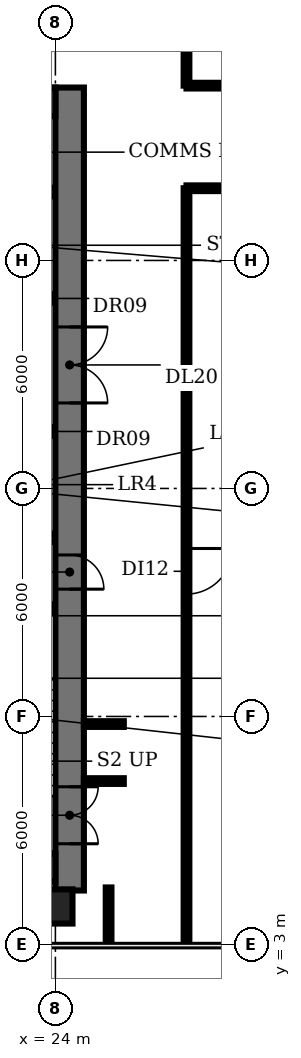
"""IFC4 building model, lengths in metres.
Left out: names, types, materials, properties, quantities, classifications, styles, units other than length and angle.
Written with IfcOpenShell. Run it as: python <this file> out.ifc"""

import sys

from ifc_helpers import new_model, si_unit, direction, frame, frame_2d, origin, origin_2d, place, context, subcontext, project, spatial, rectangle, extrude, element, fill, save


model = new_model("IFC4")
c1 = context("Model", 3, precision=1e-05, world=origin(), true_north=direction((0.0, 1.0)))
c2 = subcontext(c1, "Body", "Model", "MODEL_VIEW")
j1 = project(units=[si_unit("LENGTHUNIT", "METRE"), si_unit("PLANEANGLEUNIT", "RADIAN")], contexts=[c1])
p1 = place(None, origin())
s1 = spatial("IfcSite", under=j1, at=p1, CompositionType="ELEMENT")
p2 = place(p1, origin())
s2 = spatial("IfcBuilding", under=s1, at=p2, CompositionType="ELEMENT")
p3 = place(p2, frame((0.0, 0.0, 104.6)))
s3 = spatial("IfcBuildingStorey", under=s2, at=p3, CompositionType="ELEMENT", Elevation=104.6)
p4 = place(p3, frame((24.0, 4.0, 0.0), z_axis=(0.0, 0.0, 1.0), x_axis=(1.0, 0.0, 0.0)))
e1 = element("IfcColumn", 1, at=p4, inside=s3, PredefinedType="COLUMN", context=c2, shape_type="SweptSolid", body=[
    extrude(rectangle(XDim=0.9, YDim=0.9, at=origin_2d()), origin(), (0.0, 0.0, 1.0), 3.85),
])
p5 = place(p3, frame((20.85, 11.825, 0.0), z_axis=(0.0, 0.0, 1.0), x_axis=(1.0, 0.0, 0.0)))
e2 = element("IfcWall", 2, at=p5, inside=s3, PredefinedType="SHEAR", context=c2, shape_type="SweptSolid", body=[
    extrude(rectangle(XDim=3.15, YDim=0.25, at=frame_2d((1.575, 0.0))), origin(), (0.0, 0.0, 1.0), 3.85),
])
p6 = place(p3, frame((16.6, 13.7, 0.0), z_axis=(0.0, 0.0, 1.0), x_axis=(1.0, 0.0, 0.0)))
e3 = element("IfcWall", 3, at=p6, inside=s3, PredefinedType="PARTITIONING", context=c2, shape_type="SweptSolid", body=[
    extrude(rectangle(XDim=7.4, YDim=0.225, at=frame_2d((3.7, 0.0))), origin(), (0.0, 0.0, 1.0), 3.85),
])
p7 = place(p3, frame((9.4, 16.5, 0.0), z_axis=(0.0, 0.0, 1.0), x_axis=(1.0, 0.0, 0.0)))
e4 = element("IfcWall", 4, at=p7, inside=s3, PredefinedType="PARTITIONING", context=c2, shape_type="SweptSolid", body=[
    extrude(rectangle(XDim=14.6, YDim=0.225, at=frame_2d((7.3, 0.0))), origin(), (0.0, 0.0, 1.0), 3.85),
])
p8 = place(p7, frame((0.75, 0.0, 0.0)))
e5 = element("IfcOpeningElement", 5, at=p8, cuts=e4, PredefinedType="OPENING", context=c2, shape_type="SweptSolid", body=[
    extrude(rectangle(XDim=1.1, YDim=2.1, at=frame_2d((0.55, 1.05))), frame((0.0, 0.123, 0.0), z_axis=(0.0, -1.0, 0.0), x_axis=(1.0, 0.0, 0.0)), (0.0, 0.0, 1.0), 0.245),
])
p9 = place(p7, frame((3.55, 0.0, 0.0)))
e6 = element("IfcOpeningElement", 6, at=p9, cuts=e4, PredefinedType="OPENING", context=c2, shape_type="SweptSolid", body=[
    extrude(rectangle(XDim=1.1, YDim=2.1, at=frame_2d((0.55, 1.05))), frame((0.0, 0.123, 0.0), z_axis=(0.0, -1.0, 0.0), x_axis=(1.0, 0.0, 0.0)), (0.0, 0.0, 1.0), 0.245),
])
p10 = place(p7, frame((6.35, 0.0, 0.0)))
e7 = element("IfcOpeningElement", 7, at=p10, cuts=e4, PredefinedType="OPENING", context=c2, shape_type="SweptSolid", body=[
    extrude(rectangle(XDim=1.1, YDim=2.1, at=frame_2d((0.55, 1.05))), frame((0.0, 0.123, 0.0), z_axis=(0.0, -1.0, 0.0), x_axis=(1.0, 0.0, 0.0)), (0.0, 0.0, 1.0), 0.245),
])
p11 = place(p7, frame((9.15, 0.0, 0.0)))
e8 = element("IfcOpeningElement", 8, at=p11, cuts=e4, PredefinedType="OPENING", context=c2, shape_type="SweptSolid", body=[
    extrude(rectangle(XDim=1.1, YDim=2.1, at=frame_2d((0.55, 1.05))), frame((0.0, 0.123, 0.0), z_axis=(0.0, -1.0, 0.0), x_axis=(1.0, 0.0, 0.0)), (0.0, 0.0, 1.0), 0.245),
])
p12 = place(p7, frame((11.647, 0.0, 0.0)))
e9 = element("IfcOpeningElement", 9, at=p12, cuts=e4, PredefinedType="OPENING", context=c2, shape_type="SweptSolid", body=[
    extrude(rectangle(XDim=0.9, YDim=2.1, at=frame_2d((0.45, 1.05))), frame((0.0, 0.123, 0.0), z_axis=(0.0, -1.0, 0.0), x_axis=(1.0, 0.0, 0.0)), (0.0, 0.0, 1.0), 0.245),
])
p13 = place(p7, frame((13.423, 0.0, 0.0)))
e10 = element("IfcOpeningElement", 10, at=p13, cuts=e4, PredefinedType="OPENING", context=c2, shape_type="SweptSolid", body=[
    extrude(rectangle(XDim=0.9, YDim=2.1, at=frame_2d((0.45, 1.05))), frame((0.0, 0.123, 0.0), z_axis=(0.0, -1.0, 0.0), x_axis=(1.0, 0.0, 0.0)), (0.0, 0.0, 1.0), 0.245),
])
p14 = place(p3, frame((24.0, 20.0, 0.0), z_axis=(0.0, 0.0, 1.0), x_axis=(-1.0, 0.0, 0.0)))
e11 = element("IfcWall", 11, at=p14, inside=s3, PredefinedType="PARTITIONING", context=c2, shape_type="SweptSolid", body=[
    extrude(rectangle(XDim=14.6, YDim=0.225, at=frame_2d((7.3, 0.0))), origin(), (0.0, 0.0, 1.0), 3.85),
])
p15 = place(p14, frame((12.9, 0.0, 0.0)))
e12 = element("IfcOpeningElement", 12, at=p15, cuts=e11, PredefinedType="OPENING", context=c2, shape_type="SweptSolid", body=[
    extrude(rectangle(XDim=0.9, YDim=2.1, at=frame_2d((0.45, 1.05))), frame((0.0, 0.123, 0.0), z_axis=(0.0, -1.0, 0.0), x_axis=(1.0, 0.0, 0.0)), (0.0, 0.0, 1.0), 0.245),
])
p16 = place(p14, frame((9.475, 0.0, 0.0)))
e13 = element("IfcOpeningElement", 13, at=p16, cuts=e11, PredefinedType="OPENING", context=c2, shape_type="SweptSolid", body=[
    extrude(rectangle(XDim=1.0, YDim=2.1, at=frame_2d((0.5, 1.05))), frame((0.0, 0.123, 0.0), z_axis=(0.0, -1.0, 0.0), x_axis=(1.0, 0.0, 0.0)), (0.0, 0.0, 1.0), 0.245),
])
p17 = place(p14, frame((6.375, 0.0, 0.0)))
e14 = element("IfcOpeningElement", 14, at=p17, cuts=e11, PredefinedType="OPENING", context=c2, shape_type="SweptSolid", body=[
    extrude(rectangle(XDim=0.9, YDim=2.1, at=frame_2d((0.45, 1.05))), frame((0.0, 0.123, 0.0), z_axis=(0.0, -1.0, 0.0), x_axis=(1.0, 0.0, 0.0)), (0.0, 0.0, 1.0), 0.245),
])
p18 = place(p14, frame((4.175, 0.0, 0.0)))
e15 = element("IfcOpeningElement", 15, at=p18, cuts=e11, PredefinedType="OPENING", context=c2, shape_type="SweptSolid", body=[
    extrude(rectangle(XDim=0.9, YDim=2.1, at=frame_2d((0.45, 1.05))), frame((0.0, 0.123, 0.0), z_axis=(0.0, -1.0, 0.0), x_axis=(1.0, 0.0, 0.0)), (0.0, 0.0, 1.0), 0.245),
])
p19 = place(p14, frame((2.137, 0.0, 0.0)))
e16 = element("IfcOpeningElement", 16, at=p19, cuts=e11, PredefinedType="OPENING", context=c2, shape_type="SweptSolid", body=[
    extrude(rectangle(XDim=0.9, YDim=2.1, at=frame_2d((0.45, 1.05))), frame((0.0, 0.123, 0.0), z_axis=(0.0, -1.0, 0.0), x_axis=(1.0, 0.0, 0.0)), (0.0, 0.0, 1.0), 0.245),
])
p20 = place(p14, frame((0.363, 0.0, 0.0)))
e17 = element("IfcOpeningElement", 17, at=p20, cuts=e11, PredefinedType="OPENING", context=c2, shape_type="SweptSolid", body=[
    extrude(rectangle(XDim=0.9, YDim=2.1, at=frame_2d((0.45, 1.05))), frame((0.0, 0.123, 0.0), z_axis=(0.0, -1.0, 0.0), x_axis=(1.0, 0.0, 0.0)), (0.0, 0.0, 1.0), 0.245),
])
p21 = place(p3, frame((9.4, 22.8, 0.0), z_axis=(0.0, 0.0, 1.0), x_axis=(1.0, 0.0, 0.0)))
e18 = element("IfcWall", 18, at=p21, inside=s3, PredefinedType="PARTITIONING", context=c2, shape_type="SweptSolid", body=[
    extrude(rectangle(XDim=14.6, YDim=0.225, at=frame_2d((7.3, 0.0))), origin(), (0.0, 0.0, 1.0), 3.85),
])
p22 = place(p3, frame((24.375, 25.55, 0.0), z_axis=(0.0, 0.0, 1.0), x_axis=(0.0, -1.0, 0.0)))
e19 = element("IfcWall", 19, at=p22, inside=s3, PredefinedType="SHEAR", context=c2, shape_type="SweptSolid", body=[
    extrude(rectangle(XDim=21.13, YDim=0.75, at=frame_2d((10.565, 0.0))), origin(), (0.0, 0.0, 1.0), 3.85),
])
p23 = place(p22, frame((18.4, 0.0, 0.0)))
e20 = element("IfcOpeningElement", 20, at=p23, cuts=e19, PredefinedType="OPENING", context=c2, shape_type="SweptSolid", body=[
    extrude(rectangle(XDim=1.5, YDim=2.1, at=frame_2d((0.75, 1.05))), frame((0.0, 0.385, 0.0), z_axis=(0.0, -1.0, 0.0), x_axis=(1.0, 0.0, 0.0)), (0.0, 0.0, 1.0), 0.77),
])
p24 = place(p22, frame((12.3, 0.0, 0.0)))
e21 = element("IfcOpeningElement", 21, at=p24, cuts=e19, PredefinedType="OPENING", context=c2, shape_type="SweptSolid", body=[
    extrude(rectangle(XDim=0.9, YDim=2.1, at=frame_2d((0.45, 1.05))), frame((0.0, 0.385, 0.0), z_axis=(0.0, -1.0, 0.0), x_axis=(1.0, 0.0, 0.0)), (0.0, 0.0, 1.0), 0.77),
])
p25 = place(p22, frame((6.3, 0.0, 0.0)))
e22 = element("IfcOpeningElement", 22, at=p25, cuts=e19, PredefinedType="OPENING", context=c2, shape_type="SweptSolid", body=[
    extrude(rectangle(XDim=2.0, YDim=2.1, at=frame_2d((1.0, 1.05))), frame((0.0, 0.385, 0.0), z_axis=(0.0, -1.0, 0.0), x_axis=(1.0, 0.0, 0.0)), (0.0, 0.0, 1.0), 0.77),
])
p26 = place(p3, frame((24.0, 5.025, 0.0), z_axis=(0.0, 0.0, 1.0), x_axis=(-1.0, 0.0, 0.0)))
e23 = element("IfcWall", 23, at=p26, inside=s3, PredefinedType="SHEAR", context=c2, shape_type="SweptSolid", body=[
    extrude(rectangle(XDim=18.0, YDim=0.75, at=frame_2d((9.0, 0.0))), origin(), (0.0, 0.0, 1.0), 3.85),
])
p27 = place(p26, frame((0.825, 0.0, 0.0)))
e24 = element("IfcOpeningElement", 24, at=p27, cuts=e23, PredefinedType="OPENING", context=c2, shape_type="SweptSolid", body=[
    extrude(rectangle(XDim=1.5, YDim=2.1, at=frame_2d((0.75, 1.05))), frame((0.0, 0.385, 0.0), z_axis=(0.0, -1.0, 0.0), x_axis=(1.0, 0.0, 0.0)), (0.0, 0.0, 1.0), 0.77),
])
p28 = place(p26, frame((15.675, 0.0, 0.0)))
e25 = element("IfcOpeningElement", 25, at=p28, cuts=e23, PredefinedType="OPENING", context=c2, shape_type="SweptSolid", body=[
    extrude(rectangle(XDim=1.5, YDim=2.1, at=frame_2d((0.75, 1.05))), frame((0.0, 0.385, 0.0), z_axis=(0.0, -1.0, 0.0), x_axis=(1.0, 0.0, 0.0)), (0.0, 0.0, 1.0), 0.77),
])
p29 = place(p26, frame((13.0, 0.0, 0.0)))
e26 = element("IfcOpeningElement", 26, at=p29, cuts=e23, PredefinedType="OPENING", context=c2, shape_type="SweptSolid", body=[
    extrude(rectangle(XDim=1.2, YDim=2.1, at=frame_2d((0.6, 1.05))), frame((0.0, 0.385, 0.0), z_axis=(0.0, -1.0, 0.0), x_axis=(1.0, 0.0, 0.0)), (0.0, 0.0, 1.0), 0.77),
])
p30 = place(p26, frame((4.35, 0.0, 0.0)))
e27 = element("IfcOpeningElement", 27, at=p30, cuts=e23, PredefinedType="OPENING", context=c2, shape_type="SweptSolid", body=[
    extrude(rectangle(XDim=1.0, YDim=2.1, at=frame_2d((0.5, 1.05))), frame((0.0, 0.385, 0.0), z_axis=(0.0, -1.0, 0.0), x_axis=(1.0, 0.0, 0.0)), (0.0, 0.0, 1.0), 0.77),
])
p31 = place(p3, frame((6.0, 25.175, 0.0), z_axis=(0.0, 0.0, 1.0), x_axis=(1.0, 0.0, 0.0)))
e28 = element("IfcWall", 28, at=p31, inside=s3, PredefinedType="SHEAR", context=c2, shape_type="SweptSolid", body=[
    extrude(rectangle(XDim=18.0, YDim=0.75, at=frame_2d((9.0, 0.0))), origin(), (0.0, 0.0, 1.0), 3.85),
])
for number, where, z_axis, x_axis in (
    (29, (24.75, 7.3, 0.0), (0.0, 0.0, 1.0), (1.0, 0.0, 0.0)),
    (30, (24.75, 8.8, 0.0), (0.0, 0.0, 1.0), (1.0, 0.0, 0.0)),
):
    element("IfcWall", number, at=place(p3, frame(where, z_axis=z_axis, x_axis=x_axis)), inside=s3, PredefinedType="PARTITIONING", context=c2, shape_type="SweptSolid", body=[
        extrude(rectangle(XDim=1.05, YDim=0.15, at=frame_2d((0.525, 0.0))), origin(), (0.0, 0.0, 1.0), 2.83),
    ])
p32 = place(p3, frame((25.4, 3.02, 0.0), z_axis=(0.0, 0.0, 1.0), x_axis=(0.0, 1.0, 0.0)))
e31 = element("IfcWall", 31, at=p32, inside=s3, PredefinedType="PARTITIONING", context=c2, shape_type="SweptSolid", body=[
    extrude(rectangle(XDim=1.48, YDim=0.15, at=frame_2d((0.74, 0.0))), origin(), (0.0, 0.0, 1.0), 2.83),
])
p33 = place(p3, frame((27.45, 22.9, 0.0), z_axis=(0.0, 0.0, 1.0), x_axis=(0.0, -1.0, 0.0)))
e32 = element("IfcWall", 32, at=p33, inside=s3, PredefinedType="PARTITIONING", context=c2, shape_type="SweptSolid", body=[
    extrude(rectangle(XDim=19.88, YDim=0.15, at=frame_2d((9.94, 0.0))), origin(), (0.0, 0.0, 1.0), 2.83),
])
p34 = place(p33, frame((9.48, 0.0, 0.0)))
e33 = element("IfcOpeningElement", 33, at=p34, cuts=e32, PredefinedType="OPENING", context=c2, shape_type="SweptSolid", body=[
    extrude(rectangle(XDim=1.2, YDim=2.1, at=frame_2d((0.6, 1.05))), frame((0.0, 0.085, 0.0), z_axis=(0.0, -1.0, 0.0), x_axis=(1.0, 0.0, 0.0)), (0.0, 0.0, 1.0), 0.17),
])
p35 = place(p3, frame((27.45, 22.9, 0.0), z_axis=(0.0, 0.0, 1.0), x_axis=(1.0, 0.0, 0.0)))
e34 = element("IfcWall", 34, at=p35, inside=s3, PredefinedType="PARTITIONING", context=c2, shape_type="SweptSolid", body=[
    extrude(rectangle(XDim=14.55, YDim=0.15, at=frame_2d((7.275, 0.0))), origin(), (0.0, 0.0, 1.0), 2.83),
])
p36 = place(p3, frame((27.45, 25.6, 0.0), z_axis=(0.0, 0.0, 1.0), x_axis=(0.0, 1.0, 0.0)))
e35 = element("IfcWall", 35, at=p36, inside=s3, PredefinedType="PARTITIONING", context=c2, shape_type="SweptSolid", body=[
    extrude(rectangle(XDim=3.85, YDim=0.15, at=frame_2d((1.925, 0.0))), origin(), (0.0, 0.0, 1.0), 2.83),
])
p37 = place(p3, frame((27.45, 25.6, 0.0), z_axis=(0.0, 0.0, 1.0), x_axis=(1.0, 0.0, 0.0)))
e36 = element("IfcWall", 36, at=p37, inside=s3, PredefinedType="PARTITIONING", context=c2, shape_type="SweptSolid", body=[
    extrude(rectangle(XDim=8.55, YDim=0.15, at=frame_2d((4.275, 0.0))), origin(), (0.0, 0.0, 1.0), 2.83),
])
p38 = place(p37, frame((4.15, 0.0, 0.0)))
e37 = element("IfcOpeningElement", 37, at=p38, cuts=e36, PredefinedType="OPENING", context=c2, shape_type="SweptSolid", body=[
    extrude(rectangle(XDim=0.9, YDim=2.1, at=frame_2d((0.45, 1.05))), frame((0.0, 0.085, 0.0), z_axis=(0.0, -1.0, 0.0), x_axis=(1.0, 0.0, 0.0)), (0.0, 0.0, 1.0), 0.17),
])
p39 = place(p23, origin())
e38 = element("IfcDoor", 38, at=p39, inside=s3, OperationType="DOUBLE_DOOR_SINGLE_SWING", PredefinedType="DOOR", context=c2, shape_type="SweptSolid", body=[
    extrude(rectangle(XDim=1.5, YDim=2.1, at=frame_2d((0.75, 1.05))), frame((0.0, 0.025, 0.0), z_axis=(0.0, -1.0, 0.0), x_axis=(1.0, 0.0, 0.0)), (0.0, 0.0, 1.0), 0.05),
])
fill(e20, e38)
p40 = place(p24, origin())
e39 = element("IfcDoor", 39, at=p40, inside=s3, OperationType="SINGLE_SWING_RIGHT", PredefinedType="DOOR", context=c2, shape_type="SweptSolid", body=[
    extrude(rectangle(XDim=0.9, YDim=2.1, at=frame_2d((0.45, 1.05))), frame((0.0, -0.315, 0.0), z_axis=(0.0, -1.0, 0.0), x_axis=(1.0, 0.0, 0.0)), (0.0, 0.0, 1.0), 0.05),
])
fill(e21, e39)
p41 = place(p25, origin())
e40 = element("IfcDoor", 40, at=p41, inside=s3, OperationType="DOUBLE_DOOR_SINGLE_SWING", PredefinedType="DOOR", context=c2, shape_type="SweptSolid", body=[
    extrude(rectangle(XDim=2.0, YDim=2.1, at=frame_2d((1.0, 1.05))), frame((0.0, 0.025, 0.0), z_axis=(0.0, -1.0, 0.0), x_axis=(1.0, 0.0, 0.0)), (0.0, 0.0, 1.0), 0.05),
])
fill(e22, e40)
p42 = place(p34, origin())
e41 = element("IfcDoor", 41, at=p42, inside=s3, OperationType="SINGLE_SWING_LEFT", PredefinedType="DOOR", context=c2, shape_type="SweptSolid", body=[
    extrude(rectangle(XDim=1.2, YDim=2.1, at=frame_2d((0.6, 1.05))), frame((0.0, 0.025, 0.0), z_axis=(0.0, -1.0, 0.0), x_axis=(1.0, 0.0, 0.0)), (0.0, 0.0, 1.0), 0.05),
])
fill(e33, e41)
save(model, sys.argv[1])
